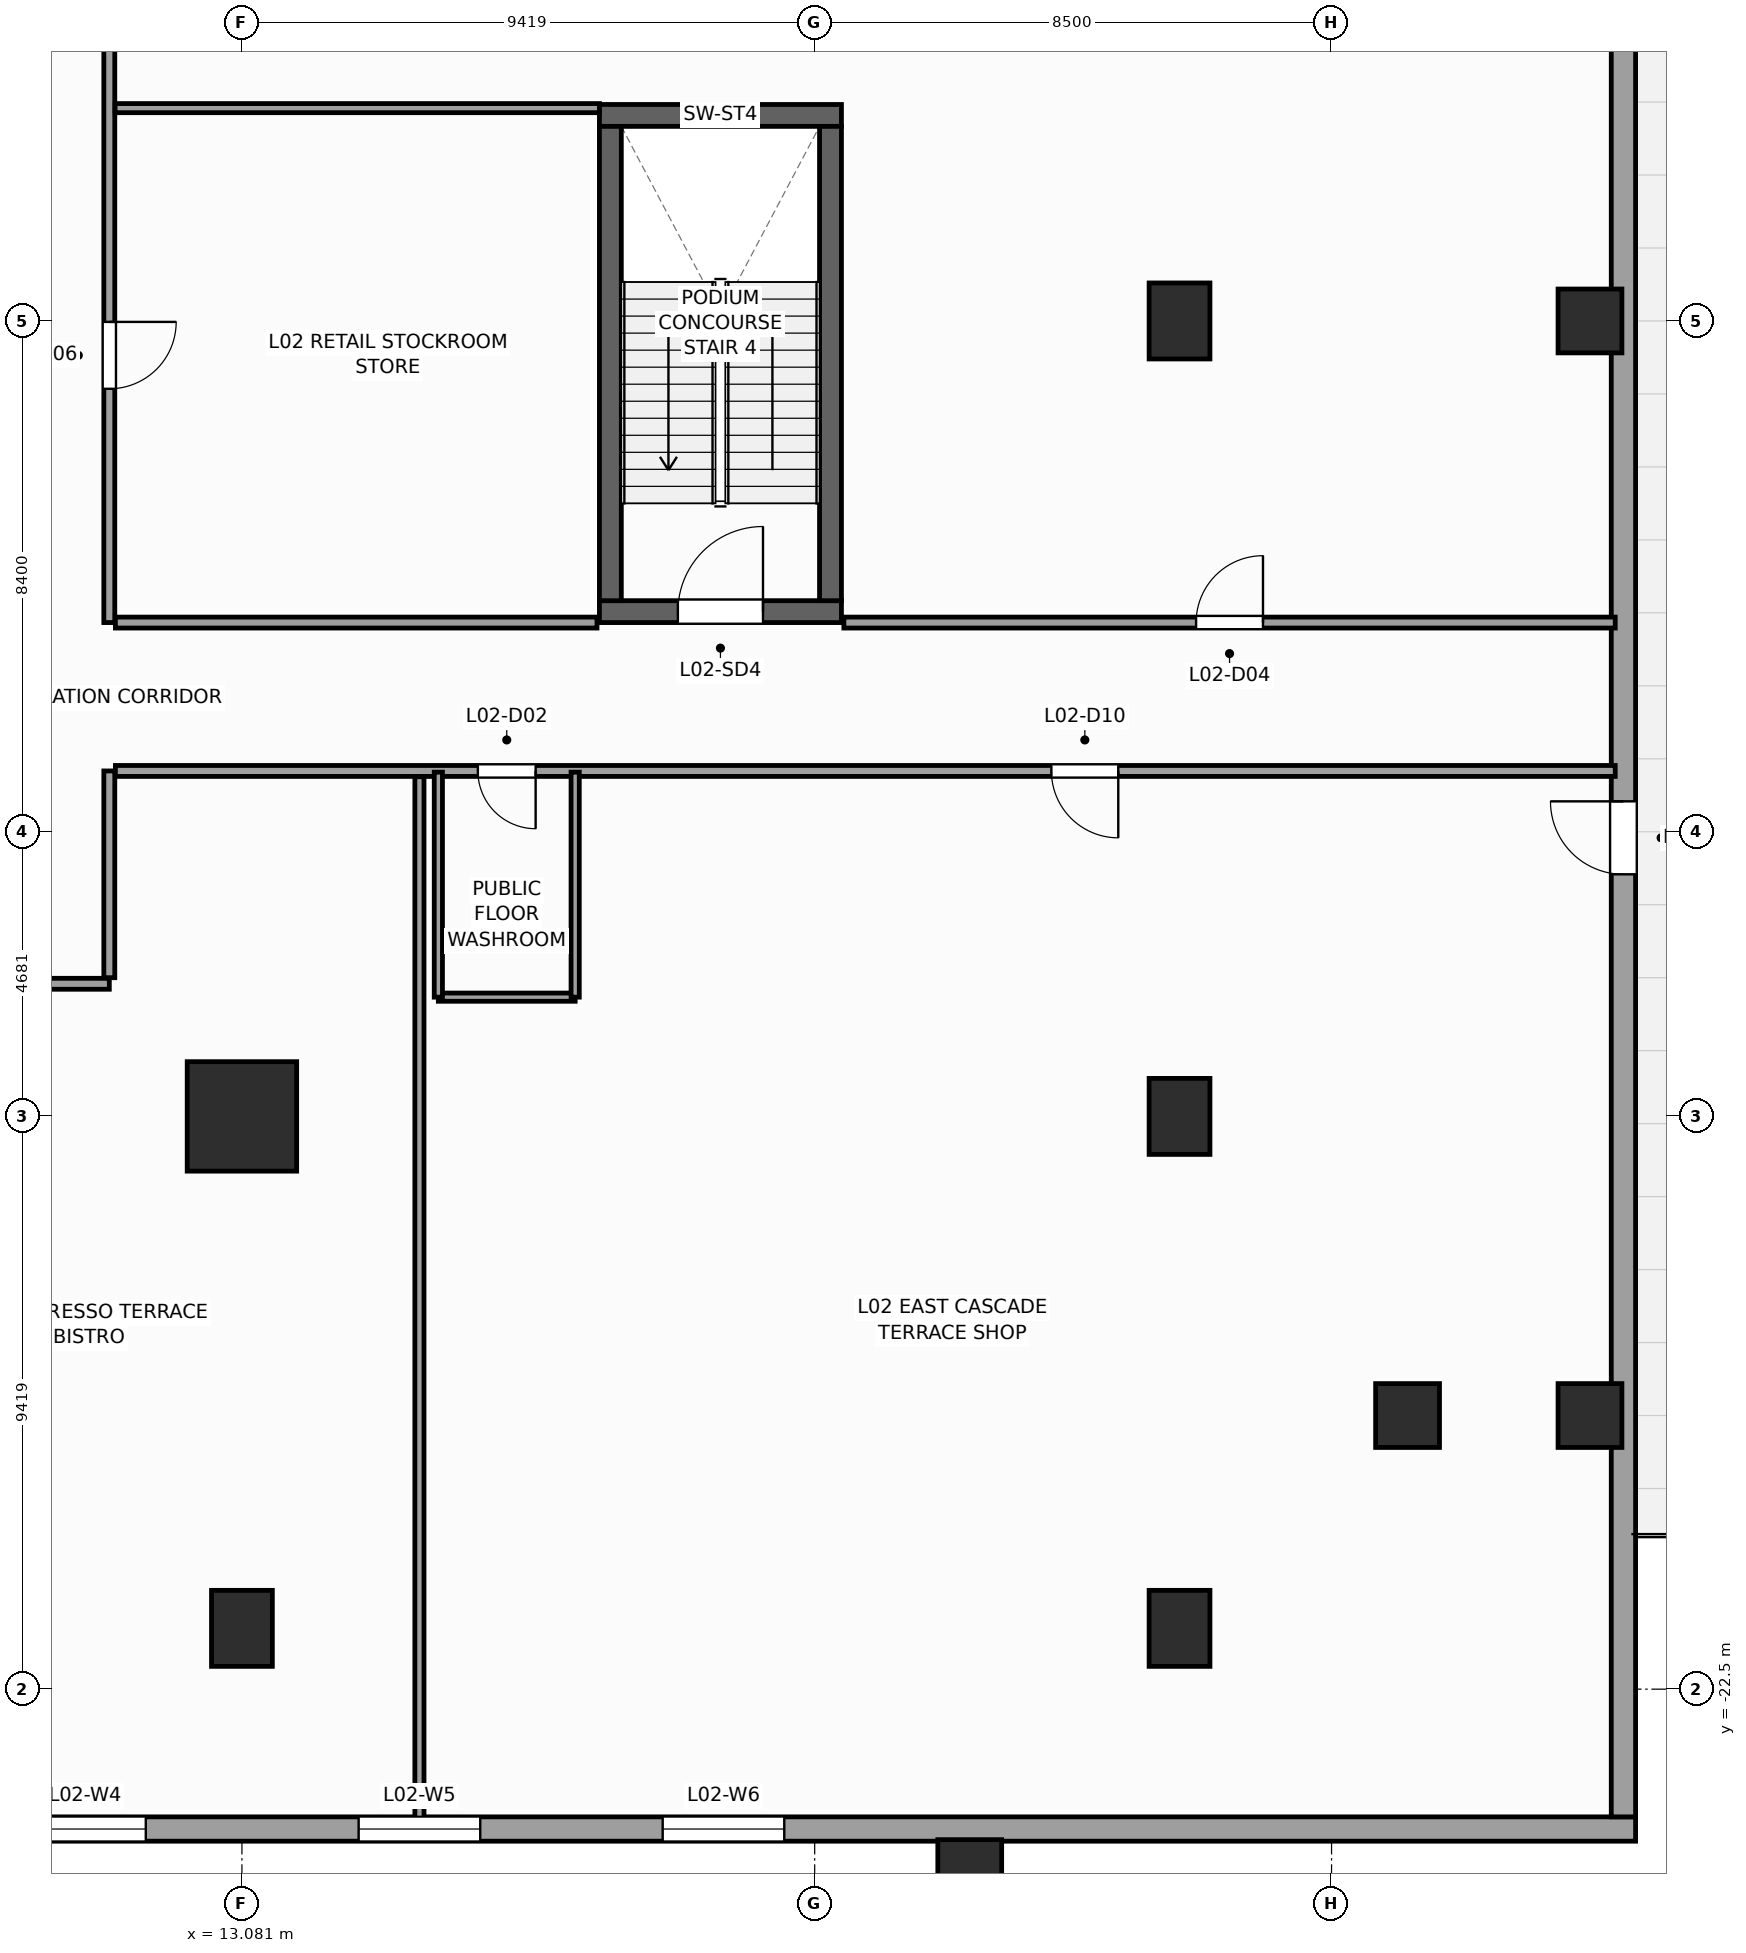
"""IFC4 building model, lengths in metres.
Left out: names, types, materials, properties, quantities, classifications, styles, units other than length and angle.
Written with IfcOpenShell. Run it as: python <this file> out.ifc"""

import sys

from ifc_helpers import new_model, si_unit, direction, frame, frame_2d, origin, origin_2d, place, context, subcontext, project, spatial, rectangle, extrude, source, transform, mapped, element, fill, save


model = new_model("IFC4")
c1 = context("Model", 3, precision=1e-05, world=origin(), true_north=direction((0.0, 1.0)))
c2 = subcontext(c1, "Body", "Model", "MODEL_VIEW")
j1 = project(units=[si_unit("LENGTHUNIT", "METRE"), si_unit("PLANEANGLEUNIT", "RADIAN")], contexts=[c1])
p1 = place(None, origin())
s1 = spatial("IfcSite", under=j1, at=p1, CompositionType="ELEMENT")
p2 = place(p1, origin())
s2 = spatial("IfcBuilding", under=s1, at=p2, CompositionType="ELEMENT")
p3 = place(p2, frame((0.0, 0.0, 11.0)))
s3 = spatial("IfcBuildingStorey", under=s2, at=p3, CompositionType="ELEMENT", Elevation=11.0)
p4 = place(p3, frame((18.96, -4.78, 0.0), z_axis=(0.0, 0.0, 1.0), x_axis=(1.0, 0.0, 0.0)))
e1 = element("IfcWall", 1, at=p4, inside=s3, PredefinedType="SHEAR", context=c2, shape_type="SweptSolid", body=[
    extrude(rectangle(XDim=3.98, YDim=0.36, at=frame_2d((1.99, 0.0))), origin(), (0.0, 0.0, 1.0), 5.0),
])
p5 = place(p4, frame((1.29, 0.0, 0.0)))
e2 = element("IfcOpeningElement", 2, at=p5, cuts=e1, PredefinedType="OPENING", context=c2, shape_type="SweptSolid", body=[
    extrude(rectangle(XDim=1.4, YDim=2.2, at=frame_2d((0.7, 1.1))), frame((0.0, 0.19, 0.0), z_axis=(0.0, -1.0, 0.0), x_axis=(1.0, 0.0, 0.0)), (0.0, 0.0, 1.0), 0.38),
])
p6 = place(p3, frame((18.96, 3.38, 0.0), z_axis=(0.0, 0.0, 1.0), x_axis=(1.0, 0.0, 0.0)))
e3 = element("IfcWall", 3, at=p6, inside=s3, PredefinedType="SHEAR", context=c2, shape_type="SweptSolid", body=[
    extrude(rectangle(XDim=3.98, YDim=0.36, at=frame_2d((1.99, 0.0))), origin(), (0.0, 0.0, 1.0), 5.0),
])
for number, where, z_axis, x_axis in (
    (4, (19.14, -4.6, 0.0), (0.0, 0.0, 1.0), (0.0, 1.0, 0.0)),
    (5, (22.76, -4.6, 0.0), (0.0, 0.0, 1.0), (0.0, 1.0, 0.0)),
):
    element("IfcWall", number, at=place(p3, frame(where, z_axis=z_axis, x_axis=x_axis)), inside=s3, PredefinedType="SHEAR", context=c2, shape_type="SweptSolid", body=[
        extrude(rectangle(XDim=7.8, YDim=0.36, at=frame_2d((3.9, 0.0))), origin(), (0.0, 0.0, 1.0), 5.0),
    ])
m1 = source(origin(), c2, "Body", "SweptSolid", [
    extrude(rectangle(XDim=1.8, YDim=1.8, at=origin_2d()), origin(), (0.0, 0.0, 1.0), 5.0),
])
p7 = place(p3, frame((13.081, -13.081, 0.0), z_axis=(0.0, 0.0, 1.0), x_axis=(1.0, 0.0, 0.0)))
e6 = element("IfcColumn", 6, at=p7, inside=s3, PredefinedType="COLUMN", context=c2, shape_type="MappedRepresentation", body=[
    mapped(m1, transform((0.0, 0.0, 0.0), scale=1.0)),
])
m2 = source(origin(), c2, "Body", "SweptSolid", [
    extrude(rectangle(XDim=1.0, YDim=1.25, at=origin_2d()), origin(), (0.0, 0.0, 1.0), 5.0),
])
for number, where, z_axis, x_axis in (
    (7, (13.081, -21.5, 0.0), (0.0, 0.0, 1.0), (1.0, 0.0, 0.0)),
    (8, (28.5, -21.5, 0.0), (0.0, 0.0, 1.0), (1.0, 0.0, 0.0)),
    (9, (28.5, -13.081, 0.0), (0.0, 0.0, 1.0), (1.0, 0.0, 0.0)),
    (10, (28.5, 0.0, 0.0), (0.0, 0.0, 1.0), (1.0, 0.0, 0.0)),
):
    element("IfcColumn", number, at=place(p3, frame(where, z_axis=z_axis, x_axis=x_axis)), inside=s3, PredefinedType="COLUMN", context=c2, shape_type="MappedRepresentation", body=[
        mapped(m2, transform((0.0, 0.0, 0.0), scale=1.0)),
    ])
m3 = source(origin(), c2, "Body", "SweptSolid", [
    extrude(rectangle(XDim=1.05, YDim=1.05, at=origin_2d()), origin(), (0.0, 0.0, 1.0), 5.0),
])
for number, where, z_axis, x_axis in (
    (11, (25.05, -25.5, 0.0), (0.0, 0.0, 1.0), (1.0, 0.0, 0.0)),
    (12, (32.25, -18.0, 0.0), (0.0, 0.0, 1.0), (1.0, 0.0, 0.0)),
    (13, (35.25, -18.0, 0.0), (0.0, 0.0, 1.0), (1.0, 0.0, 0.0)),
    (14, (35.25, 0.0, 0.0), (0.0, 0.0, 1.0), (1.0, 0.0, 0.0)),
):
    element("IfcColumn", number, at=place(p3, frame(where, z_axis=z_axis, x_axis=x_axis)), inside=s3, PredefinedType="COLUMN", context=c2, shape_type="MappedRepresentation", body=[
        mapped(m3, transform((0.0, 0.0, 0.0), scale=1.0)),
    ])
p8 = place(p3, frame((-2.0, -24.8, 0.0), z_axis=(0.0, 0.0, 1.0), x_axis=(1.0, 0.0, 0.0)))
e15 = element("IfcWall", 15, at=p8, inside=s3, PredefinedType="STANDARD", context=c2, shape_type="SweptSolid", body=[
    extrude(rectangle(XDim=38.0, YDim=0.4, at=frame_2d((19.0, 0.0))), origin(), (0.0, 0.0, 1.0), 4.66),
])
p9 = place(p8, frame((11.5, 0.0, 0.85)))
e16 = element("IfcOpeningElement", 16, at=p9, cuts=e15, PredefinedType="OPENING", context=c2, shape_type="SweptSolid", body=[
    extrude(rectangle(XDim=2.0, YDim=2.8, at=frame_2d((1.0, 1.4))), frame((0.0, 0.21, 0.0), z_axis=(0.0, -1.0, 0.0), x_axis=(1.0, 0.0, 0.0)), (0.0, 0.0, 1.0), 0.42),
])
p10 = place(p8, frame((17.0, 0.0, 0.85)))
e17 = element("IfcOpeningElement", 17, at=p10, cuts=e15, PredefinedType="OPENING", context=c2, shape_type="SweptSolid", body=[
    extrude(rectangle(XDim=2.0, YDim=2.8, at=frame_2d((1.0, 1.4))), frame((0.0, 0.21, 0.0), z_axis=(0.0, -1.0, 0.0), x_axis=(1.0, 0.0, 0.0)), (0.0, 0.0, 1.0), 0.42),
])
p11 = place(p8, frame((22.0, 0.0, 0.85)))
e18 = element("IfcOpeningElement", 18, at=p11, cuts=e15, PredefinedType="OPENING", context=c2, shape_type="SweptSolid", body=[
    extrude(rectangle(XDim=2.0, YDim=2.8, at=frame_2d((1.0, 1.4))), frame((0.0, 0.21, 0.0), z_axis=(0.0, -1.0, 0.0), x_axis=(1.0, 0.0, 0.0)), (0.0, 0.0, 1.0), 0.42),
])
p12 = place(p3, frame((35.8, -24.6, 0.0), z_axis=(0.0, 0.0, 1.0), x_axis=(0.0, 1.0, 0.0)))
e19 = element("IfcWall", 19, at=p12, inside=s3, PredefinedType="STANDARD", context=c2, shape_type="SweptSolid", body=[
    extrude(rectangle(XDim=49.2, YDim=0.4, at=frame_2d((24.6, 0.0))), origin(), (0.0, 0.0, 1.0), 4.66),
])
p13 = place(p12, frame((15.5, 0.0, 0.0)))
e20 = element("IfcOpeningElement", 20, at=p13, cuts=e19, PredefinedType="OPENING", context=c2, shape_type="SweptSolid", body=[
    extrude(rectangle(XDim=1.2, YDim=2.3, at=frame_2d((0.6, 1.15))), frame((0.0, 0.21, 0.0), z_axis=(0.0, -1.0, 0.0), x_axis=(1.0, 0.0, 0.0)), (0.0, 0.0, 1.0), 0.42),
])
p14 = place(p3, frame((4.1, -10.9, 0.0), z_axis=(0.0, 0.0, 1.0), x_axis=(1.0, 0.0, 0.0)))
e21 = element("IfcWall", 21, at=p14, inside=s3, PredefinedType="PARTITIONING", context=c2, shape_type="SweptSolid", body=[
    extrude(rectangle(XDim=6.8, YDim=0.18, at=frame_2d((3.4, 0.0))), origin(), (0.0, 0.0, 1.0), 4.66),
])
p15 = place(p3, frame((10.9, -10.8, 0.0), z_axis=(0.0, 0.0, 1.0), x_axis=(0.0, 1.0, 0.0)))
e22 = element("IfcWall", 22, at=p15, inside=s3, PredefinedType="PARTITIONING", context=c2, shape_type="SweptSolid", body=[
    extrude(rectangle(XDim=3.4, YDim=0.18, at=frame_2d((1.7, 0.0))), origin(), (0.0, 0.0, 1.0), 4.66),
])
p16 = place(p3, frame((10.9, -4.96, 0.0), z_axis=(0.0, 0.0, 1.0), x_axis=(0.0, 1.0, 0.0)))
e23 = element("IfcWall", 23, at=p16, inside=s3, PredefinedType="PARTITIONING", context=c2, shape_type="SweptSolid", body=[
    extrude(rectangle(XDim=15.76, YDim=0.18, at=frame_2d((7.88, 0.0))), origin(), (0.0, 0.0, 1.0), 4.66),
])
p17 = place(p16, frame((3.844, 0.0, 0.0)))
e24 = element("IfcOpeningElement", 24, at=p17, cuts=e23, PredefinedType="OPENING", context=c2, shape_type="SweptSolid", body=[
    extrude(rectangle(XDim=1.1, YDim=2.2, at=frame_2d((0.55, 1.1))), frame((0.0, 0.1, 0.0), z_axis=(0.0, -1.0, 0.0), x_axis=(1.0, 0.0, 0.0)), (0.0, 0.0, 1.0), 0.2),
])
p18 = place(p3, frame((11.0, -7.4, 0.0), z_axis=(0.0, 0.0, 1.0), x_axis=(1.0, 0.0, 0.0)))
e25 = element("IfcWall", 25, at=p18, inside=s3, PredefinedType="PARTITIONING", context=c2, shape_type="SweptSolid", body=[
    extrude(rectangle(XDim=24.665, YDim=0.18, at=frame_2d((12.333, 0.0))), origin(), (0.0, 0.0, 1.0), 4.66),
])
p19 = place(p18, frame((5.961, 0.0, 0.0)))
e26 = element("IfcOpeningElement", 26, at=p19, cuts=e25, PredefinedType="OPENING", context=c2, shape_type="SweptSolid", body=[
    extrude(rectangle(XDim=0.95, YDim=2.1, at=frame_2d((0.475, 1.05))), frame((0.0, 0.1, 0.0), z_axis=(0.0, -1.0, 0.0), x_axis=(1.0, 0.0, 0.0)), (0.0, 0.0, 1.0), 0.2),
])
p20 = place(p18, frame((15.393, 0.0, 0.0)))
e27 = element("IfcOpeningElement", 27, at=p20, cuts=e25, PredefinedType="OPENING", context=c2, shape_type="SweptSolid", body=[
    extrude(rectangle(XDim=1.1, YDim=2.2, at=frame_2d((0.55, 1.1))), frame((0.0, 0.1, 0.0), z_axis=(0.0, -1.0, 0.0), x_axis=(1.0, 0.0, 0.0)), (0.0, 0.0, 1.0), 0.2),
])
p21 = place(p3, frame((11.0, -4.96, 0.0), z_axis=(0.0, 0.0, 1.0), x_axis=(1.0, 0.0, 0.0)))
e28 = element("IfcWall", 28, at=p21, inside=s3, PredefinedType="PARTITIONING", context=c2, shape_type="SweptSolid", body=[
    extrude(rectangle(XDim=7.92, YDim=0.18, at=frame_2d((3.96, 0.0))), origin(), (0.0, 0.0, 1.0), 4.66),
])
p22 = place(p3, frame((22.98, -4.96, 0.0), z_axis=(0.0, 0.0, 1.0), x_axis=(1.0, 0.0, 0.0)))
e29 = element("IfcWall", 29, at=p22, inside=s3, PredefinedType="PARTITIONING", context=c2, shape_type="SweptSolid", body=[
    extrude(rectangle(XDim=12.685, YDim=0.18, at=frame_2d((6.343, 0.0))), origin(), (0.0, 0.0, 1.0), 4.66),
])
p23 = place(p22, frame((5.792, 0.0, 0.0)))
e30 = element("IfcOpeningElement", 30, at=p23, cuts=e29, PredefinedType="OPENING", context=c2, shape_type="SweptSolid", body=[
    extrude(rectangle(XDim=1.1, YDim=2.2, at=frame_2d((0.55, 1.1))), frame((0.0, 0.1, 0.0), z_axis=(0.0, -1.0, 0.0), x_axis=(1.0, 0.0, 0.0)), (0.0, 0.0, 1.0), 0.2),
])
p24 = place(p3, frame((10.995, 3.5, 0.0), z_axis=(0.0, 0.0, 1.0), x_axis=(1.0, 0.0, 0.0)))
e31 = element("IfcWall", 31, at=p24, inside=s3, PredefinedType="PARTITIONING", context=c2, shape_type="SweptSolid", body=[
    extrude(rectangle(XDim=7.965, YDim=0.15, at=frame_2d((3.982, 0.0))), origin(), (0.0, 0.0, 1.0), 4.66),
])
p25 = place(p3, frame((16.0, -24.665, 0.0), z_axis=(0.0, 0.0, 1.0), x_axis=(0.0, 1.0, 0.0)))
e32 = element("IfcWall", 32, at=p25, inside=s3, PredefinedType="PARTITIONING", context=c2, shape_type="SweptSolid", body=[
    extrude(rectangle(XDim=17.17, YDim=0.15, at=frame_2d((8.585, 0.0))), origin(), (0.0, 0.0, 1.0), 4.66),
])
p26 = place(p3, frame((16.311, -11.12, 0.0), z_axis=(0.0, 0.0, 1.0), x_axis=(1.0, 0.0, 0.0)))
e33 = element("IfcWall", 33, at=p26, inside=s3, PredefinedType="PARTITIONING", context=c2, shape_type="SweptSolid", body=[
    extrude(rectangle(XDim=2.25, YDim=0.135, at=frame_2d((1.125, 0.0))), origin(), (0.0, 0.0, 1.0), 4.66),
])
for number, where, z_axis, x_axis in (
    (34, (18.561, -11.12, 0.0), (0.0, 0.0, 1.0), (0.0, 1.0, 0.0)),
    (35, (16.311, -11.12, 0.0), (0.0, 0.0, 1.0), (0.0, 1.0, 0.0)),
):
    element("IfcWall", number, at=place(p3, frame(where, z_axis=z_axis, x_axis=x_axis)), inside=s3, PredefinedType="PARTITIONING", context=c2, shape_type="SweptSolid", body=[
        extrude(rectangle(XDim=3.7, YDim=0.135, at=frame_2d((1.85, 0.0))), origin(), (0.0, 0.0, 1.0), 4.66),
    ])
m4 = source(origin(), c2, "Body", "SweptSolid", [
    extrude(rectangle(XDim=2.0, YDim=2.8, at=frame_2d((1.0, 1.4))), frame((0.0, 0.03, 0.0), z_axis=(0.0, -1.0, 0.0), x_axis=(1.0, 0.0, 0.0)), (0.0, 0.0, 1.0), 0.06),
])
p27 = place(p9, origin())
e36 = element("IfcWindow", 36, at=p27, inside=s3, PartitioningType="SINGLE_PANEL", PredefinedType="WINDOW", context=c2, shape_type="MappedRepresentation", body=[
    mapped(m4, transform((0.0, 0.0, 0.0), scale=1.0)),
])
fill(e16, e36)
p28 = place(p10, origin())
e37 = element("IfcWindow", 37, at=p28, inside=s3, PartitioningType="SINGLE_PANEL", PredefinedType="WINDOW", context=c2, shape_type="MappedRepresentation", body=[
    mapped(m4, transform((0.0, 0.0, 0.0), scale=1.0)),
])
fill(e17, e37)
p29 = place(p11, origin())
e38 = element("IfcWindow", 38, at=p29, inside=s3, PartitioningType="SINGLE_PANEL", PredefinedType="WINDOW", context=c2, shape_type="MappedRepresentation", body=[
    mapped(m4, transform((0.0, 0.0, 0.0), scale=1.0)),
])
fill(e18, e38)
m5 = source(origin(), c2, "Body", "SweptSolid", [
    extrude(rectangle(XDim=1.2, YDim=2.3, at=frame_2d((0.6, 1.15))), frame((0.0, 0.025, 0.0), z_axis=(0.0, -1.0, 0.0), x_axis=(1.0, 0.0, 0.0)), (0.0, 0.0, 1.0), 0.05),
])
p30 = place(p13, origin())
e39 = element("IfcDoor", 39, at=p30, inside=s3, OperationType="SINGLE_SWING_RIGHT", PredefinedType="DOOR", context=c2, shape_type="MappedRepresentation", body=[
    mapped(m5, transform((0.0, 0.0, 0.0), scale=1.0)),
])
fill(e20, e39)
m6 = source(origin(), c2, "Body", "SweptSolid", [
    extrude(rectangle(XDim=1.4, YDim=2.2, at=frame_2d((0.7, 1.1))), frame((0.0, 0.025, 0.0), z_axis=(0.0, -1.0, 0.0), x_axis=(1.0, 0.0, 0.0)), (0.0, 0.0, 1.0), 0.05),
])
p31 = place(p5, origin())
e40 = element("IfcDoor", 40, at=p31, inside=s3, OperationType="SINGLE_SWING_RIGHT", PredefinedType="DOOR", context=c2, shape_type="MappedRepresentation", body=[
    mapped(m6, transform((0.0, 0.0, 0.0), scale=1.0)),
])
fill(e2, e40)
m7 = source(origin(), c2, "Body", "SweptSolid", [
    extrude(rectangle(XDim=0.95, YDim=2.1, at=frame_2d((0.475, 1.05))), frame((0.0, 0.025, 0.0), z_axis=(0.0, -1.0, 0.0), x_axis=(1.0, 0.0, 0.0)), (0.0, 0.0, 1.0), 0.05),
])
p32 = place(p19, frame((0.95, 0.0, 0.0), z_axis=(0.0, 0.0, 1.0), x_axis=(-1.0, 0.0, 0.0)))
e41 = element("IfcDoor", 41, at=p32, inside=s3, OperationType="SINGLE_SWING_RIGHT", PredefinedType="DOOR", context=c2, shape_type="MappedRepresentation", body=[
    mapped(m7, transform((0.0, 0.0, 0.0), scale=1.0)),
])
fill(e26, e41)
m8 = source(origin(), c2, "Body", "SweptSolid", [
    extrude(rectangle(XDim=1.1, YDim=2.2, at=frame_2d((0.55, 1.1))), frame((0.0, 0.025, 0.0), z_axis=(0.0, -1.0, 0.0), x_axis=(1.0, 0.0, 0.0)), (0.0, 0.0, 1.0), 0.05),
])
p33 = place(p23, origin())
e42 = element("IfcDoor", 42, at=p33, inside=s3, OperationType="SINGLE_SWING_RIGHT", PredefinedType="DOOR", context=c2, shape_type="MappedRepresentation", body=[
    mapped(m8, transform((0.0, 0.0, 0.0), scale=1.0)),
])
fill(e30, e42)
p34 = place(p17, frame((1.1, 0.0, 0.0), z_axis=(0.0, 0.0, 1.0), x_axis=(-1.0, 0.0, 0.0)))
e43 = element("IfcDoor", 43, at=p34, inside=s3, OperationType="SINGLE_SWING_RIGHT", PredefinedType="DOOR", context=c2, shape_type="MappedRepresentation", body=[
    mapped(m8, transform((0.0, 0.0, 0.0), scale=1.0)),
])
fill(e24, e43)
p35 = place(p20, frame((1.1, 0.0, 0.0), z_axis=(0.0, 0.0, 1.0), x_axis=(-1.0, 0.0, 0.0)))
e44 = element("IfcDoor", 44, at=p35, inside=s3, OperationType="SINGLE_SWING_RIGHT", PredefinedType="DOOR", context=c2, shape_type="MappedRepresentation", body=[
    mapped(m8, transform((0.0, 0.0, 0.0), scale=1.0)),
])
fill(e27, e44)
save(model, sys.argv[1])
